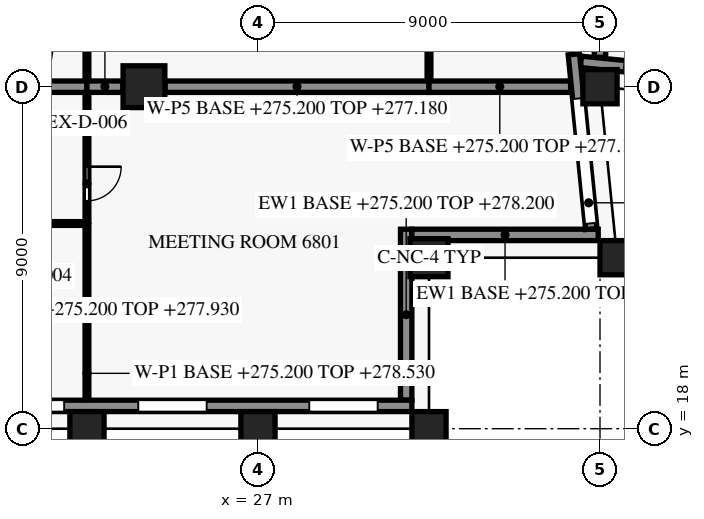
"""IFC4 building model, lengths in metres.
Left out: names, types, materials, properties, quantities, classifications, styles, units other than length and angle.
Written with IfcOpenShell. Run it as: python <this file> out.ifc"""

import sys

from ifc_helpers import new_model, si_unit, direction, frame, frame_2d, origin, origin_2d, place, context, subcontext, project, spatial, rectangle, extrude, element, fill, save


model = new_model("IFC4")
c1 = context("Model", 3, precision=1e-05, world=origin(), true_north=direction((0.0, 1.0)))
c2 = subcontext(c1, "Body", "Model", "MODEL_VIEW")
j1 = project(units=[si_unit("LENGTHUNIT", "METRE"), si_unit("PLANEANGLEUNIT", "RADIAN")], contexts=[c1])
p1 = place(None, origin())
s1 = spatial("IfcSite", under=j1, at=p1, CompositionType="ELEMENT")
p2 = place(p1, origin())
s2 = spatial("IfcBuilding", under=s1, at=p2, CompositionType="ELEMENT")
p3 = place(p2, frame((0.0, 0.0, 275.2)))
s3 = spatial("IfcBuildingStorey", under=s2, at=p3, CompositionType="ELEMENT", Elevation=275.2)
for number, where, z_axis, x_axis in (
    (1, (22.5, 18.0, 0.0), (0.0, 0.0, 1.0), (1.0, 0.0, 0.0)),
    (2, (27.0, 18.0, 0.0), (0.0, 0.0, 1.0), (1.0, 0.0, 0.0)),
    (3, (31.5, 18.0, 0.0), (0.0, 0.0, 1.0), (1.0, 0.0, 0.0)),
    (4, (36.45, 22.5, 0.0), (0.0, 0.0, 1.0), (-0.1, 0.995, 0.0)),
    (5, (36.0, 27.0, 0.0), (0.0, 0.0, 1.0), (-0.1, 0.995, 0.0)),
):
    element("IfcColumn", number, at=place(p3, frame(where, z_axis=z_axis, x_axis=x_axis)), inside=s3, PredefinedType="COLUMN", context=c2, shape_type="SweptSolid", body=[
        extrude(rectangle(XDim=0.9, YDim=0.9, at=origin_2d()), origin(), (0.0, 0.0, 1.0), 3.8),
    ])
p4 = place(p3, frame((31.5, 22.5, 0.0), z_axis=(0.0, 0.0, 1.0), x_axis=(1.0, 0.0, 0.0)))
e6 = element("IfcColumn", 6, at=p4, inside=s3, PredefinedType="COLUMN", context=c2, shape_type="SweptSolid", body=[
    extrude(rectangle(XDim=1.0, YDim=1.0, at=origin_2d()), origin(), (0.0, 0.0, 1.0), 3.8),
])
p5 = place(p3, frame((24.0, 27.0, 0.0), z_axis=(0.0, 0.0, 1.0), x_axis=(1.0, 0.0, 0.0)))
e7 = element("IfcColumn", 7, at=p5, inside=s3, PredefinedType="COLUMN", context=c2, shape_type="SweptSolid", body=[
    extrude(rectangle(XDim=1.1, YDim=1.1, at=origin_2d()), origin(), (0.0, 0.0, 1.0), 3.8),
])
p6 = place(p3, frame((31.05, 18.6, 0.0), z_axis=(0.0, 0.0, 1.0), x_axis=(-1.0, 0.0, 0.0)))
e8 = element("IfcWall", 8, at=p6, inside=s3, PredefinedType="SOLIDWALL", context=c2, shape_type="SweptSolid", body=[
    extrude(rectangle(XDim=25.8, YDim=0.3, at=frame_2d((12.9, 0.0))), origin(), (0.0, 0.0, 1.0), 3.0),
])
p7 = place(p6, frame((0.9, 0.0, 0.75)))
e9 = element("IfcOpeningElement", 9, at=p7, cuts=e8, PredefinedType="OPENING", context=c2, shape_type="SweptSolid", body=[
    extrude(rectangle(XDim=1.8, YDim=1.8, at=frame_2d((0.9, 0.9))), frame((0.0, 0.16, 0.0), z_axis=(0.0, -1.0, 0.0), x_axis=(1.0, 0.0, 0.0)), (0.0, 0.0, 1.0), 0.32),
])
p8 = place(p6, frame((5.4, 0.0, 0.75)))
e10 = element("IfcOpeningElement", 10, at=p8, cuts=e8, PredefinedType="OPENING", context=c2, shape_type="SweptSolid", body=[
    extrude(rectangle(XDim=1.8, YDim=1.8, at=frame_2d((0.9, 0.9))), frame((0.0, 0.16, 0.0), z_axis=(0.0, -1.0, 0.0), x_axis=(1.0, 0.0, 0.0)), (0.0, 0.0, 1.0), 0.32),
])
p9 = place(p6, frame((9.15, 0.0, 0.15)))
e11 = element("IfcOpeningElement", 11, at=p9, cuts=e8, PredefinedType="OPENING", context=c2, shape_type="SweptSolid", body=[
    extrude(rectangle(XDim=3.3, YDim=2.4, at=frame_2d((1.65, 1.2))), frame((0.0, 0.16, 0.0), z_axis=(0.0, -1.0, 0.0), x_axis=(1.0, 0.0, 0.0)), (0.0, 0.0, 1.0), 0.32),
])
p10 = place(p6, frame((13.65, 0.0, 0.15)))
e12 = element("IfcOpeningElement", 12, at=p10, cuts=e8, PredefinedType="OPENING", context=c2, shape_type="SweptSolid", body=[
    extrude(rectangle(XDim=3.3, YDim=2.4, at=frame_2d((1.65, 1.2))), frame((0.0, 0.16, 0.0), z_axis=(0.0, -1.0, 0.0), x_axis=(1.0, 0.0, 0.0)), (0.0, 0.0, 1.0), 0.32),
])
p11 = place(p6, frame((18.9, 0.0, 0.75)))
e13 = element("IfcOpeningElement", 13, at=p11, cuts=e8, PredefinedType="OPENING", context=c2, shape_type="SweptSolid", body=[
    extrude(rectangle(XDim=1.8, YDim=1.8, at=frame_2d((0.9, 0.9))), frame((0.0, 0.16, 0.0), z_axis=(0.0, -1.0, 0.0), x_axis=(1.0, 0.0, 0.0)), (0.0, 0.0, 1.0), 0.32),
])
p12 = place(p3, frame((30.9, 23.25, 0.0), z_axis=(0.0, 0.0, 1.0), x_axis=(0.0, -1.0, 0.0)))
e14 = element("IfcWall", 14, at=p12, inside=s3, PredefinedType="SOLIDWALL", context=c2, shape_type="SweptSolid", body=[
    extrude(rectangle(XDim=4.5, YDim=0.3, at=frame_2d((2.25, 0.0))), origin(), (0.0, 0.0, 1.0), 3.0),
])
p13 = place(p3, frame((35.953, 23.1, 0.0), z_axis=(0.0, 0.0, 1.0), x_axis=(-1.0, 0.0, 0.0)))
e15 = element("IfcWall", 15, at=p13, inside=s3, PredefinedType="SOLIDWALL", context=c2, shape_type="SweptSolid", body=[
    extrude(rectangle(XDim=4.903, YDim=0.3, at=frame_2d((2.451, 0.0))), origin(), (0.0, 0.0, 1.0), 3.0),
])
p14 = place(p3, frame((35.312, 27.852, 0.0), z_axis=(0.0, 0.0, 1.0), x_axis=(0.099503719021, -0.99503719021, 0.0)))
e16 = element("IfcWall", 16, at=p14, inside=s3, PredefinedType="SOLIDWALL", context=c2, shape_type="SweptSolid", body=[
    extrude(rectangle(XDim=4.62, YDim=0.3, at=frame_2d((2.31, 0.0))), origin(), (0.0, 0.0, 1.0), 3.0),
])
p15 = place(p14, frame((1.17, 0.0, 0.15)))
e17 = element("IfcOpeningElement", 17, at=p15, cuts=e16, PredefinedType="OPENING", context=c2, shape_type="SweptSolid", body=[
    extrude(rectangle(XDim=3.3, YDim=2.4, at=frame_2d((1.65, 1.2))), frame((0.0, 0.16, 0.0), z_axis=(0.0, -1.0, 0.0), x_axis=(1.0, 0.0, 0.0)), (0.0, 0.0, 1.0), 0.32),
])
p16 = place(p3, frame((40.065, 27.197, 0.0), z_axis=(0.0, 0.0, 1.0), x_axis=(-0.995036663613, 0.099508984853, 0.0)))
e18 = element("IfcWall", 18, at=p16, inside=s3, PredefinedType="SOLIDWALL", context=c2, shape_type="SweptSolid", body=[
    extrude(rectangle(XDim=4.59, YDim=0.3, at=frame_2d((2.295, 0.0))), origin(), (0.0, 0.0, 1.0), 3.0),
])
p17 = place(p16, frame((0.15, 0.0, 0.15)))
e19 = element("IfcOpeningElement", 19, at=p17, cuts=e18, PredefinedType="OPENING", context=c2, shape_type="SweptSolid", body=[
    extrude(rectangle(XDim=3.3, YDim=2.4, at=frame_2d((1.65, 1.2))), frame((0.0, 0.16, 0.0), z_axis=(0.0, -1.0, 0.0), x_axis=(1.0, 0.0, 0.0)), (0.0, 0.0, 1.0), 0.32),
])
p18 = place(p3, frame((22.5, 23.35, 0.0), z_axis=(0.0, 0.0, 1.0), x_axis=(0.0, -1.0, 0.0)))
e20 = element("IfcWall", 20, at=p18, inside=s3, PredefinedType="PARTITIONING", context=c2, shape_type="SweptSolid", body=[
    extrude(rectangle(XDim=4.58, YDim=0.1, at=frame_2d((2.29, 0.0))), origin(), (0.0, 0.0, 1.0), 3.33),
])
p19 = place(p3, frame((22.45, 23.4, 0.0), z_axis=(0.0, 0.0, 1.0), x_axis=(-1.0, 0.0, 0.0)))
e21 = element("IfcWall", 21, at=p19, inside=s3, PredefinedType="PARTITIONING", context=c2, shape_type="SweptSolid", body=[
    extrude(rectangle(XDim=4.45, YDim=0.1, at=frame_2d((2.225, 0.0))), origin(), (0.0, 0.0, 1.0), 2.98),
])
p20 = place(p19, frame((1.75, 0.0, 0.0)))
e22 = element("IfcOpeningElement", 22, at=p20, cuts=e21, PredefinedType="OPENING", context=c2, shape_type="SweptSolid", body=[
    extrude(rectangle(XDim=0.9, YDim=2.1, at=frame_2d((0.45, 1.05))), frame((0.0, 0.06, 0.0), z_axis=(0.0, -1.0, 0.0), x_axis=(1.0, 0.0, 0.0)), (0.0, 0.0, 1.0), 0.12),
])
p21 = place(p3, frame((22.5, 26.83, 0.0), z_axis=(0.0, 0.0, 1.0), x_axis=(0.0, -1.0, 0.0)))
e23 = element("IfcWall", 23, at=p21, inside=s3, PredefinedType="PARTITIONING", context=c2, shape_type="SweptSolid", body=[
    extrude(rectangle(XDim=3.38, YDim=0.1, at=frame_2d((1.69, 0.0))), origin(), (0.0, 0.0, 1.0), 1.98),
])
p22 = place(p21, frame((1.935, 0.0, 0.0)))
e24 = element("IfcOpeningElement", 24, at=p22, cuts=e23, PredefinedType="OPENING", context=c2, shape_type="SweptSolid", body=[
    extrude(rectangle(XDim=0.9, YDim=2.1, at=frame_2d((0.45, 1.05))), frame((0.0, 0.06, 0.0), z_axis=(0.0, -1.0, 0.0), x_axis=(1.0, 0.0, 0.0)), (0.0, 0.0, 1.0), 0.12),
])
p23 = place(p3, frame((20.4, 27.0, 0.0), z_axis=(0.0, 0.0, 1.0), x_axis=(1.0, 0.0, 0.0)))
e25 = element("IfcWall", 25, at=p23, inside=s3, PredefinedType="PARTITIONING", context=c2, shape_type="SweptSolid", body=[
    extrude(rectangle(XDim=2.1, YDim=0.3, at=frame_2d((1.05, 0.0))), origin(), (0.0, 0.0, 1.0), 1.98),
])
p24 = place(p3, frame((22.5, 27.0, 0.0), z_axis=(0.0, 0.0, 1.0), x_axis=(1.0, 0.0, 0.0)))
e26 = element("IfcWall", 26, at=p24, inside=s3, PredefinedType="PARTITIONING", context=c2, shape_type="SweptSolid", body=[
    extrude(rectangle(XDim=0.945, YDim=0.3, at=frame_2d((0.473, 0.0))), origin(), (0.0, 0.0, 1.0), 1.98),
])
p25 = place(p3, frame((24.555, 27.0, 0.0), z_axis=(0.0, 0.0, 1.0), x_axis=(1.0, 0.0, 0.0)))
e27 = element("IfcWall", 27, at=p25, inside=s3, PredefinedType="PARTITIONING", context=c2, shape_type="SweptSolid", body=[
    extrude(rectangle(XDim=6.945, YDim=0.3, at=frame_2d((3.473, 0.0))), origin(), (0.0, 0.0, 1.0), 1.98),
])
p26 = place(p3, frame((31.5, 27.0, 0.0), z_axis=(0.0, 0.0, 1.0), x_axis=(1.0, 0.0, 0.0)))
e28 = element("IfcWall", 28, at=p26, inside=s3, PredefinedType="PARTITIONING", context=c2, shape_type="SweptSolid", body=[
    extrude(rectangle(XDim=3.726, YDim=0.3, at=frame_2d((1.863, 0.0))), origin(), (0.0, 0.0, 1.0), 1.98),
])
p27 = place(p3, frame((36.0, 27.774, 0.0), z_axis=(0.0, 0.0, 1.0), x_axis=(0.0, 1.0, 0.0)))
e29 = element("IfcWall", 29, at=p27, inside=s3, PredefinedType="PARTITIONING", context=c2, shape_type="SweptSolid", body=[
    extrude(rectangle(XDim=10.671, YDim=0.3, at=frame_2d((5.336, 0.0))), origin(), (0.0, 0.0, 1.0), 1.98),
])
p28 = place(p3, frame((22.5, 33.45, 0.0), z_axis=(0.0, 0.0, 1.0), x_axis=(0.0, -1.0, 0.0)))
e30 = element("IfcWall", 30, at=p28, inside=s3, PredefinedType="PARTITIONING", context=c2, shape_type="SweptSolid", body=[
    extrude(rectangle(XDim=6.28, YDim=0.1, at=frame_2d((3.14, 0.0))), origin(), (0.0, 0.0, 1.0), 1.98),
])
p29 = place(p3, frame((31.5, 40.95, 0.0), z_axis=(0.0, 0.0, 1.0), x_axis=(0.0, -1.0, 0.0)))
e31 = element("IfcWall", 31, at=p29, inside=s3, PredefinedType="PARTITIONING", context=c2, shape_type="SweptSolid", body=[
    extrude(rectangle(XDim=13.78, YDim=0.1, at=frame_2d((6.89, 0.0))), origin(), (0.0, 0.0, 1.0), 1.98),
])
p30 = place(p29, frame((6.5, 0.0, 0.0)))
e32 = element("IfcOpeningElement", 32, at=p30, cuts=e31, PredefinedType="OPENING", context=c2, shape_type="SweptSolid", body=[
    extrude(rectangle(XDim=0.9, YDim=2.1, at=frame_2d((0.45, 1.05))), frame((0.0, 0.06, 0.0), z_axis=(0.0, -1.0, 0.0), x_axis=(1.0, 0.0, 0.0)), (0.0, 0.0, 1.0), 0.12),
])
p31 = place(p7, origin())
e33 = element("IfcWindow", 33, at=p31, inside=s3, PartitioningType="SINGLE_PANEL", PredefinedType="WINDOW", context=c2, shape_type="SweptSolid", body=[
    extrude(rectangle(XDim=1.8, YDim=1.8, at=frame_2d((0.9, 0.9))), frame((0.0, 0.03, 0.0), z_axis=(0.0, -1.0, 0.0), x_axis=(1.0, 0.0, 0.0)), (0.0, 0.0, 1.0), 0.06),
])
fill(e9, e33)
p32 = place(p8, origin())
e34 = element("IfcWindow", 34, at=p32, inside=s3, PartitioningType="SINGLE_PANEL", PredefinedType="WINDOW", context=c2, shape_type="SweptSolid", body=[
    extrude(rectangle(XDim=1.8, YDim=1.8, at=frame_2d((0.9, 0.9))), frame((0.0, 0.03, 0.0), z_axis=(0.0, -1.0, 0.0), x_axis=(1.0, 0.0, 0.0)), (0.0, 0.0, 1.0), 0.06),
])
fill(e10, e34)
p33 = place(p9, origin())
e35 = element("IfcWindow", 35, at=p33, inside=s3, PartitioningType="SINGLE_PANEL", PredefinedType="WINDOW", context=c2, shape_type="SweptSolid", body=[
    extrude(rectangle(XDim=3.3, YDim=2.4, at=frame_2d((1.65, 1.2))), frame((0.0, 0.03, 0.0), z_axis=(0.0, -1.0, 0.0), x_axis=(1.0, 0.0, 0.0)), (0.0, 0.0, 1.0), 0.06),
])
fill(e11, e35)
p34 = place(p15, origin())
e36 = element("IfcWindow", 36, at=p34, inside=s3, PartitioningType="SINGLE_PANEL", PredefinedType="WINDOW", context=c2, shape_type="SweptSolid", body=[
    extrude(rectangle(XDim=3.3, YDim=2.4, at=frame_2d((1.65, 1.2))), frame((0.0, 0.03, 0.0), z_axis=(0.0, -1.0, 0.0), x_axis=(1.0, 0.0, 0.0)), (0.0, 0.0, 1.0), 0.06),
])
fill(e17, e36)
p35 = place(p22, origin())
e37 = element("IfcDoor", 37, at=p35, inside=s3, OperationType="SINGLE_SWING_LEFT", PredefinedType="DOOR", context=c2, shape_type="SweptSolid", body=[
    extrude(rectangle(XDim=0.9, YDim=2.1, at=frame_2d((0.45, 1.05))), frame((0.0, 0.025, 0.0), z_axis=(0.0, -1.0, 0.0), x_axis=(1.0, 0.0, 0.0)), (0.0, 0.0, 1.0), 0.05),
])
fill(e24, e37)
save(model, sys.argv[1])
